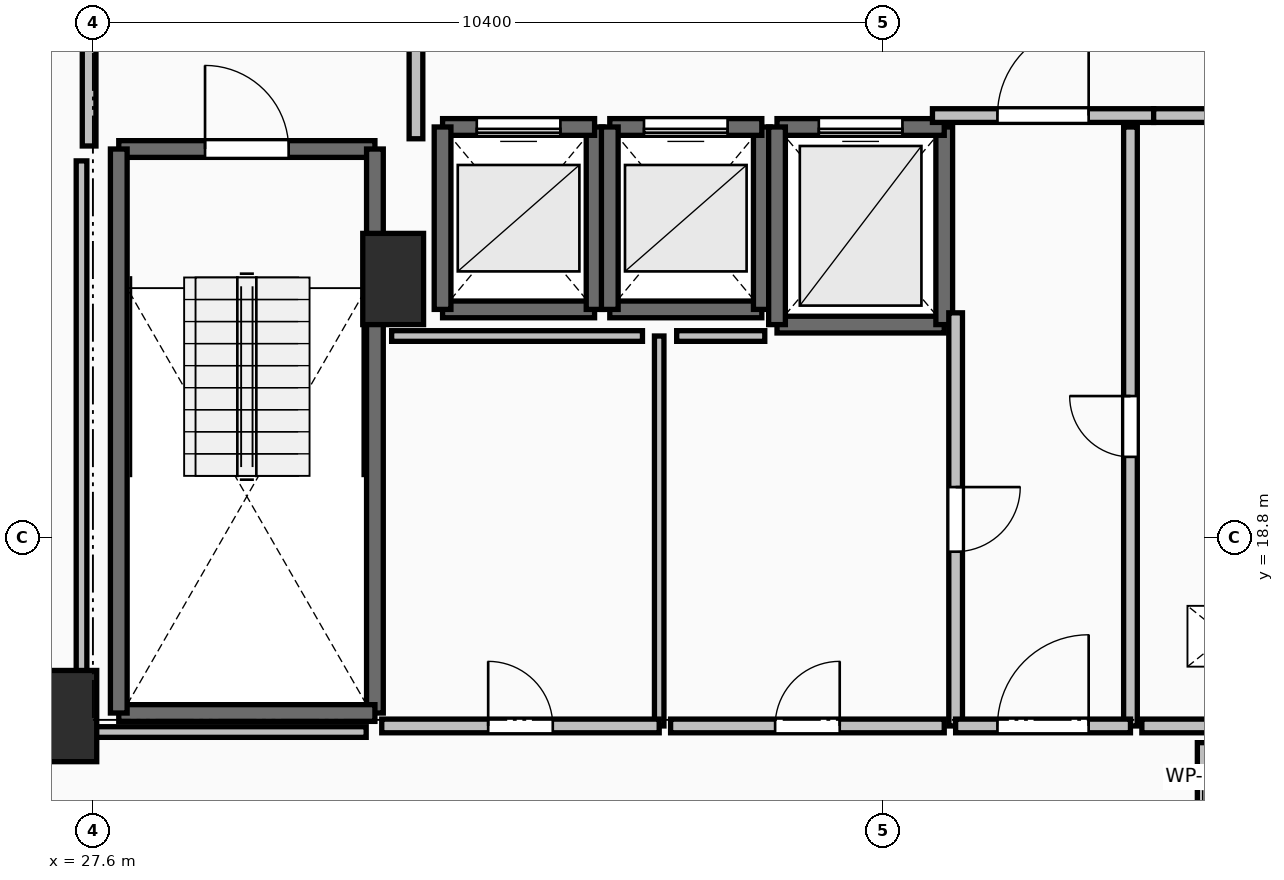
"""IFC4 building model, lengths in metres.
Left out: names, types, materials, properties, quantities, classifications, styles, units other than length and angle.
Written with IfcOpenShell. Run it as: python <this file> out.ifc"""

import sys

from ifc_helpers import new_model, si_unit, direction, frame, frame_2d, origin, origin_2d, place, context, subcontext, project, spatial, rectangle, extrude, element, fill, save


model = new_model("IFC4")
c1 = context("Model", 3, precision=1e-05, world=origin(), true_north=direction((0.0, 1.0)))
c2 = subcontext(c1, "Body", "Model", "MODEL_VIEW")
j1 = project(units=[si_unit("LENGTHUNIT", "METRE"), si_unit("PLANEANGLEUNIT", "RADIAN")], contexts=[c1])
p1 = place(None, origin())
s1 = spatial("IfcSite", under=j1, at=p1, CompositionType="ELEMENT")
p2 = place(p1, origin())
s2 = spatial("IfcBuilding", under=s1, at=p2, CompositionType="ELEMENT")
p3 = place(p2, frame((0.0, 0.0, 146.6)))
s3 = spatial("IfcBuildingStorey", under=s2, at=p3, CompositionType="ELEMENT", Elevation=146.6)
for number, where, z_axis, x_axis in (
    (1, (27.25, 16.45, 0.0), (0.0, 0.0, 1.0), (1.0, 0.0, 0.0)),
    (2, (31.55, 22.2, 0.0), (0.0, 0.0, 1.0), (1.0, 0.0, 0.0)),
):
    element("IfcColumn", number, at=place(p3, frame(where, z_axis=z_axis, x_axis=x_axis)), inside=s3, PredefinedType="PILASTER", context=c2, shape_type="SweptSolid", body=[
        extrude(rectangle(XDim=0.8, YDim=1.2, at=origin_2d()), origin(), (0.0, 0.0, 1.0), 3.5),
    ])
p4 = place(p3, frame((27.94, 23.91, 0.0), z_axis=(0.0, 0.0, 1.0), x_axis=(1.0, 0.0, 0.0)))
e3 = element("IfcWall", 3, at=p4, inside=s3, PredefinedType="SOLIDWALL", context=c2, shape_type="SweptSolid", body=[
    extrude(rectangle(XDim=3.37, YDim=0.22, at=frame_2d((1.685, 0.0))), origin(), (0.0, 0.0, 1.0), 3.24),
])
p5 = place(p4, frame((1.135, 0.0, 0.0)))
e4 = element("IfcOpeningElement", 4, at=p5, cuts=e3, PredefinedType="OPENING", context=c2, shape_type="SweptSolid", body=[
    extrude(rectangle(XDim=1.1, YDim=2.15, at=frame_2d((0.55, 1.075))), frame((0.0, 0.125, 0.0), z_axis=(0.0, -1.0, 0.0), x_axis=(1.0, 0.0, 0.0)), (0.0, 0.0, 1.0), 0.25),
])
p6 = place(p3, frame((31.31, 23.91, 0.0), z_axis=(0.0, 0.0, 1.0), x_axis=(0.0, -1.0, 0.0)))
e5 = element("IfcWall", 5, at=p6, inside=s3, PredefinedType="SOLIDWALL", context=c2, shape_type="SweptSolid", body=[
    extrude(rectangle(XDim=7.42, YDim=0.22, at=frame_2d((3.71, 0.0))), origin(), (0.0, 0.0, 1.0), 3.24),
])
p7 = place(p3, frame((31.31, 16.49, 0.0), z_axis=(0.0, 0.0, 1.0), x_axis=(-1.0, 0.0, 0.0)))
e6 = element("IfcWall", 6, at=p7, inside=s3, PredefinedType="SOLIDWALL", context=c2, shape_type="SweptSolid", body=[
    extrude(rectangle(XDim=3.37, YDim=0.22, at=frame_2d((1.685, 0.0))), origin(), (0.0, 0.0, 1.0), 3.24),
])
p8 = place(p3, frame((27.94, 16.49, 0.0), z_axis=(0.0, 0.0, 1.0), x_axis=(0.0, 1.0, 0.0)))
e7 = element("IfcWall", 7, at=p8, inside=s3, PredefinedType="SOLIDWALL", context=c2, shape_type="SweptSolid", body=[
    extrude(rectangle(XDim=7.42, YDim=0.22, at=frame_2d((3.71, 0.0))), origin(), (0.0, 0.0, 1.0), 3.24),
])
p9 = place(p3, frame((32.2, 21.8, 0.0), z_axis=(0.0, 0.0, 1.0), x_axis=(1.0, 0.0, 0.0)))
e8 = element("IfcWall", 8, at=p9, inside=s3, PredefinedType="SOLIDWALL", context=c2, shape_type="SweptSolid", body=[
    extrude(rectangle(XDim=2.0, YDim=0.22, at=frame_2d((1.0, 0.0))), origin(), (0.0, 0.0, 1.0), 3.24),
])
p10 = place(p3, frame((34.2, 21.8, 0.0), z_axis=(0.0, 0.0, 1.0), x_axis=(0.0, 1.0, 0.0)))
e9 = element("IfcWall", 9, at=p10, inside=s3, PredefinedType="SOLIDWALL", context=c2, shape_type="SweptSolid", body=[
    extrude(rectangle(XDim=2.4, YDim=0.22, at=frame_2d((1.2, 0.0))), origin(), (0.0, 0.0, 1.0), 3.24),
])
p11 = place(p3, frame((34.2, 24.2, 0.0), z_axis=(0.0, 0.0, 1.0), x_axis=(-1.0, 0.0, 0.0)))
e10 = element("IfcWall", 10, at=p11, inside=s3, PredefinedType="SOLIDWALL", context=c2, shape_type="SweptSolid", body=[
    extrude(rectangle(XDim=2.0, YDim=0.22, at=frame_2d((1.0, 0.0))), origin(), (0.0, 0.0, 1.0), 3.24),
])
p12 = place(p11, frame((0.45, 0.0, 0.0)))
e11 = element("IfcOpeningElement", 11, at=p12, cuts=e10, PredefinedType="OPENING", context=c2, shape_type="SweptSolid", body=[
    extrude(rectangle(XDim=1.1, YDim=2.2, at=frame_2d((0.55, 1.1))), frame((0.0, 0.125, 0.0), z_axis=(0.0, -1.0, 0.0), x_axis=(1.0, 0.0, 0.0)), (0.0, 0.0, 1.0), 0.25),
])
p13 = place(p3, frame((32.2, 24.2, 0.0), z_axis=(0.0, 0.0, 1.0), x_axis=(0.0, -1.0, 0.0)))
e12 = element("IfcWall", 12, at=p13, inside=s3, PredefinedType="SOLIDWALL", context=c2, shape_type="SweptSolid", body=[
    extrude(rectangle(XDim=2.4, YDim=0.22, at=frame_2d((1.2, 0.0))), origin(), (0.0, 0.0, 1.0), 3.24),
])
p14 = place(p3, frame((34.4, 21.8, 0.0), z_axis=(0.0, 0.0, 1.0), x_axis=(1.0, 0.0, 0.0)))
e13 = element("IfcWall", 13, at=p14, inside=s3, PredefinedType="SOLIDWALL", context=c2, shape_type="SweptSolid", body=[
    extrude(rectangle(XDim=2.0, YDim=0.22, at=frame_2d((1.0, 0.0))), origin(), (0.0, 0.0, 1.0), 3.24),
])
p15 = place(p3, frame((36.4, 21.8, 0.0), z_axis=(0.0, 0.0, 1.0), x_axis=(0.0, 1.0, 0.0)))
e14 = element("IfcWall", 14, at=p15, inside=s3, PredefinedType="SOLIDWALL", context=c2, shape_type="SweptSolid", body=[
    extrude(rectangle(XDim=2.4, YDim=0.22, at=frame_2d((1.2, 0.0))), origin(), (0.0, 0.0, 1.0), 3.24),
])
p16 = place(p3, frame((36.4, 24.2, 0.0), z_axis=(0.0, 0.0, 1.0), x_axis=(-1.0, 0.0, 0.0)))
e15 = element("IfcWall", 15, at=p16, inside=s3, PredefinedType="SOLIDWALL", context=c2, shape_type="SweptSolid", body=[
    extrude(rectangle(XDim=2.0, YDim=0.22, at=frame_2d((1.0, 0.0))), origin(), (0.0, 0.0, 1.0), 3.24),
])
p17 = place(p16, frame((0.45, 0.0, 0.0)))
e16 = element("IfcOpeningElement", 16, at=p17, cuts=e15, PredefinedType="OPENING", context=c2, shape_type="SweptSolid", body=[
    extrude(rectangle(XDim=1.1, YDim=2.2, at=frame_2d((0.55, 1.1))), frame((0.0, 0.125, 0.0), z_axis=(0.0, -1.0, 0.0), x_axis=(1.0, 0.0, 0.0)), (0.0, 0.0, 1.0), 0.25),
])
p18 = place(p3, frame((34.4, 24.2, 0.0), z_axis=(0.0, 0.0, 1.0), x_axis=(0.0, -1.0, 0.0)))
e17 = element("IfcWall", 17, at=p18, inside=s3, PredefinedType="SOLIDWALL", context=c2, shape_type="SweptSolid", body=[
    extrude(rectangle(XDim=2.4, YDim=0.22, at=frame_2d((1.2, 0.0))), origin(), (0.0, 0.0, 1.0), 3.24),
])
p19 = place(p3, frame((36.6, 21.6, 0.0), z_axis=(0.0, 0.0, 1.0), x_axis=(1.0, 0.0, 0.0)))
e18 = element("IfcWall", 18, at=p19, inside=s3, PredefinedType="SOLIDWALL", context=c2, shape_type="SweptSolid", body=[
    extrude(rectangle(XDim=2.2, YDim=0.22, at=frame_2d((1.1, 0.0))), origin(), (0.0, 0.0, 1.0), 3.24),
])
p20 = place(p3, frame((38.8, 21.6, 0.0), z_axis=(0.0, 0.0, 1.0), x_axis=(0.0, 1.0, 0.0)))
e19 = element("IfcWall", 19, at=p20, inside=s3, PredefinedType="SOLIDWALL", context=c2, shape_type="SweptSolid", body=[
    extrude(rectangle(XDim=2.6, YDim=0.22, at=frame_2d((1.3, 0.0))), origin(), (0.0, 0.0, 1.0), 3.24),
])
p21 = place(p3, frame((38.8, 24.2, 0.0), z_axis=(0.0, 0.0, 1.0), x_axis=(-1.0, 0.0, 0.0)))
e20 = element("IfcWall", 20, at=p21, inside=s3, PredefinedType="SOLIDWALL", context=c2, shape_type="SweptSolid", body=[
    extrude(rectangle(XDim=2.2, YDim=0.22, at=frame_2d((1.1, 0.0))), origin(), (0.0, 0.0, 1.0), 3.24),
])
p22 = place(p21, frame((0.55, 0.0, 0.0)))
e21 = element("IfcOpeningElement", 21, at=p22, cuts=e20, PredefinedType="OPENING", context=c2, shape_type="SweptSolid", body=[
    extrude(rectangle(XDim=1.1, YDim=2.2, at=frame_2d((0.55, 1.1))), frame((0.0, 0.125, 0.0), z_axis=(0.0, -1.0, 0.0), x_axis=(1.0, 0.0, 0.0)), (0.0, 0.0, 1.0), 0.25),
])
p23 = place(p3, frame((36.6, 24.2, 0.0), z_axis=(0.0, 0.0, 1.0), x_axis=(0.0, -1.0, 0.0)))
e22 = element("IfcWall", 22, at=p23, inside=s3, PredefinedType="SOLIDWALL", context=c2, shape_type="SweptSolid", body=[
    extrude(rectangle(XDim=2.6, YDim=0.22, at=frame_2d((1.3, 0.0))), origin(), (0.0, 0.0, 1.0), 3.24),
])
p24 = place(p3, frame((31.85, 24.045, 0.0), z_axis=(0.0, 0.0, 1.0), x_axis=(0.0, 1.0, 0.0)))
e23 = element("IfcWall", 23, at=p24, inside=s3, PredefinedType="PARTITIONING", context=c2, shape_type="SweptSolid", body=[
    extrude(rectangle(XDim=3.91, YDim=0.18, at=frame_2d((1.955, 0.0))), origin(), (0.0, 0.0, 1.0), 3.24),
])
p25 = place(p24, frame((1.355, 0.0, 0.0)))
e24 = element("IfcOpeningElement", 24, at=p25, cuts=e23, PredefinedType="OPENING", context=c2, shape_type="SweptSolid", body=[
    extrude(rectangle(XDim=1.2, YDim=2.15, at=frame_2d((0.6, 1.075))), frame((0.0, 0.105, 0.0), z_axis=(0.0, -1.0, 0.0), x_axis=(1.0, 0.0, 0.0)), (0.0, 0.0, 1.0), 0.21),
])
p26 = place(p3, frame((27.55, 28.0, 0.0), z_axis=(0.0, 0.0, 1.0), x_axis=(0.0, -1.0, 0.0)))
e25 = element("IfcWall", 25, at=p26, inside=s3, PredefinedType="PARTITIONING", context=c2, shape_type="SweptSolid", body=[
    extrude(rectangle(XDim=4.05, YDim=0.18, at=frame_2d((2.025, 0.0))), origin(), (0.0, 0.0, 1.0), 3.24),
])
p27 = place(p26, frame((1.425, 0.0, 0.0)))
e26 = element("IfcOpeningElement", 26, at=p27, cuts=e25, PredefinedType="OPENING", context=c2, shape_type="SweptSolid", body=[
    extrude(rectangle(XDim=1.2, YDim=2.15, at=frame_2d((0.6, 1.075))), frame((0.0, 0.105, 0.0), z_axis=(0.0, -1.0, 0.0), x_axis=(1.0, 0.0, 0.0)), (0.0, 0.0, 1.0), 0.21),
])
p28 = place(p3, frame((38.645, 24.35, 0.0), z_axis=(0.0, 0.0, 1.0), x_axis=(1.0, 0.0, 0.0)))
e27 = element("IfcWall", 27, at=p28, inside=s3, PredefinedType="PARTITIONING", context=c2, shape_type="SweptSolid", body=[
    extrude(rectangle(XDim=2.91, YDim=0.18, at=frame_2d((1.455, 0.0))), origin(), (0.0, 0.0, 1.0), 3.24),
])
p29 = place(p28, frame((0.855, 0.0, 0.0)))
e28 = element("IfcOpeningElement", 28, at=p29, cuts=e27, PredefinedType="OPENING", context=c2, shape_type="SweptSolid", body=[
    extrude(rectangle(XDim=1.2, YDim=2.15, at=frame_2d((0.6, 1.075))), frame((0.0, 0.105, 0.0), z_axis=(0.0, -1.0, 0.0), x_axis=(1.0, 0.0, 0.0)), (0.0, 0.0, 1.0), 0.21),
])
p30 = place(p3, frame((41.555, 24.35, 0.0), z_axis=(0.0, 0.0, 1.0), x_axis=(1.0, 0.0, 0.0)))
e29 = element("IfcWall", 29, at=p30, inside=s3, PredefinedType="PARTITIONING", context=c2, shape_type="SweptSolid", body=[
    extrude(rectangle(XDim=2.445, YDim=0.18, at=frame_2d((1.223, 0.0))), origin(), (0.0, 0.0, 1.0), 3.24),
])
p31 = place(p30, frame((0.823, 0.0, 0.0)))
e30 = element("IfcOpeningElement", 30, at=p31, cuts=e29, PredefinedType="OPENING", context=c2, shape_type="SweptSolid", body=[
    extrude(rectangle(XDim=0.8, YDim=2.05, at=frame_2d((0.4, 1.025))), frame((0.0, 0.105, 0.0), z_axis=(0.0, -1.0, 0.0), x_axis=(1.0, 0.0, 0.0)), (0.0, 0.0, 1.0), 0.21),
])
p32 = place(p3, frame((41.25, 16.32, 0.0), z_axis=(0.0, 0.0, 1.0), x_axis=(0.0, 1.0, 0.0)))
e31 = element("IfcWall", 31, at=p32, inside=s3, PredefinedType="PARTITIONING", context=c2, shape_type="SweptSolid", body=[
    extrude(rectangle(XDim=7.88, YDim=0.18, at=frame_2d((3.94, 0.0))), origin(), (0.0, 0.0, 1.0), 3.24),
])
p33 = place(p32, frame((3.54, 0.0, 0.0)))
e32 = element("IfcOpeningElement", 32, at=p33, cuts=e31, PredefinedType="OPENING", context=c2, shape_type="SweptSolid", body=[
    extrude(rectangle(XDim=0.8, YDim=2.05, at=frame_2d((0.4, 1.025))), frame((0.0, 0.105, 0.0), z_axis=(0.0, -1.0, 0.0), x_axis=(1.0, 0.0, 0.0)), (0.0, 0.0, 1.0), 0.21),
])
p34 = place(p3, frame((38.95, 21.755, 0.0), z_axis=(0.0, 0.0, 1.0), x_axis=(0.0, -1.0, 0.0)))
e33 = element("IfcWall", 33, at=p34, inside=s3, PredefinedType="PARTITIONING", context=c2, shape_type="SweptSolid", body=[
    extrude(rectangle(XDim=5.435, YDim=0.18, at=frame_2d((2.717, 0.0))), origin(), (0.0, 0.0, 1.0), 3.24),
])
p35 = place(p34, frame((2.292, 0.0, 0.0)))
e34 = element("IfcOpeningElement", 34, at=p35, cuts=e33, PredefinedType="OPENING", context=c2, shape_type="SweptSolid", body=[
    extrude(rectangle(XDim=0.85, YDim=2.1, at=frame_2d((0.425, 1.05))), frame((0.0, 0.105, 0.0), z_axis=(0.0, -1.0, 0.0), x_axis=(1.0, 0.0, 0.0)), (0.0, 0.0, 1.0), 0.21),
])
p36 = place(p3, frame((38.95, 16.32, 0.0), z_axis=(0.0, 0.0, 1.0), x_axis=(1.0, 0.0, 0.0)))
e35 = element("IfcWall", 35, at=p36, inside=s3, PredefinedType="PARTITIONING", context=c2, shape_type="SweptSolid", body=[
    extrude(rectangle(XDim=2.3, YDim=0.18, at=frame_2d((1.15, 0.0))), origin(), (0.0, 0.0, 1.0), 3.24),
])
p37 = place(p36, frame((0.55, 0.0, 0.0)))
e36 = element("IfcOpeningElement", 36, at=p37, cuts=e35, PredefinedType="OPENING", context=c2, shape_type="SweptSolid", body=[
    extrude(rectangle(XDim=1.2, YDim=2.15, at=frame_2d((0.6, 1.075))), frame((0.0, 0.105, 0.0), z_axis=(0.0, -1.0, 0.0), x_axis=(1.0, 0.0, 0.0)), (0.0, 0.0, 1.0), 0.21),
])
p38 = place(p3, frame((41.4, 16.32, 0.0), z_axis=(0.0, 0.0, 1.0), x_axis=(1.0, 0.0, 0.0)))
e37 = element("IfcWall", 37, at=p38, inside=s3, PredefinedType="PARTITIONING", context=c2, shape_type="SweptSolid", body=[
    extrude(rectangle(XDim=3.2, YDim=0.18, at=frame_2d((1.6, 0.0))), origin(), (0.0, 0.0, 1.0), 3.24),
])
p39 = place(p38, frame((1.2, 0.0, 0.0)))
e38 = element("IfcOpeningElement", 38, at=p39, cuts=e37, PredefinedType="OPENING", context=c2, shape_type="SweptSolid", body=[
    extrude(rectangle(XDim=0.8, YDim=2.05, at=frame_2d((0.4, 1.025))), frame((0.0, 0.105, 0.0), z_axis=(0.0, -1.0, 0.0), x_axis=(1.0, 0.0, 0.0)), (0.0, 0.0, 1.0), 0.21),
])
p40 = place(p3, frame((35.05, 16.32, 0.0), z_axis=(0.0, 0.0, 1.0), x_axis=(0.0, 1.0, 0.0)))
e39 = element("IfcWall", 39, at=p40, inside=s3, PredefinedType="PARTITIONING", context=c2, shape_type="SweptSolid", body=[
    extrude(rectangle(XDim=5.13, YDim=0.125, at=frame_2d((2.565, 0.0))), origin(), (0.0, 0.0, 1.0), 3.24),
])
p41 = place(p3, frame((31.4, 16.32, 0.0), z_axis=(0.0, 0.0, 1.0), x_axis=(1.0, 0.0, 0.0)))
e40 = element("IfcWall", 40, at=p41, inside=s3, PredefinedType="PARTITIONING", context=c2, shape_type="SweptSolid", body=[
    extrude(rectangle(XDim=3.65, YDim=0.18, at=frame_2d((1.825, 0.0))), origin(), (0.0, 0.0, 1.0), 3.24),
])
p42 = place(p41, frame((1.4, 0.0, 0.0)))
e41 = element("IfcOpeningElement", 41, at=p42, cuts=e40, PredefinedType="OPENING", context=c2, shape_type="SweptSolid", body=[
    extrude(rectangle(XDim=0.85, YDim=2.1, at=frame_2d((0.425, 1.05))), frame((0.0, 0.105, 0.0), z_axis=(0.0, -1.0, 0.0), x_axis=(1.0, 0.0, 0.0)), (0.0, 0.0, 1.0), 0.21),
])
p43 = place(p3, frame((35.2, 16.32, 0.0), z_axis=(0.0, 0.0, 1.0), x_axis=(1.0, 0.0, 0.0)))
e42 = element("IfcWall", 42, at=p43, inside=s3, PredefinedType="PARTITIONING", context=c2, shape_type="SweptSolid", body=[
    extrude(rectangle(XDim=3.6, YDim=0.18, at=frame_2d((1.8, 0.0))), origin(), (0.0, 0.0, 1.0), 3.24),
])
p44 = place(p43, frame((1.375, 0.0, 0.0)))
e43 = element("IfcOpeningElement", 43, at=p44, cuts=e42, PredefinedType="OPENING", context=c2, shape_type="SweptSolid", body=[
    extrude(rectangle(XDim=0.85, YDim=2.1, at=frame_2d((0.425, 1.05))), frame((0.0, 0.105, 0.0), z_axis=(0.0, -1.0, 0.0), x_axis=(1.0, 0.0, 0.0)), (0.0, 0.0, 1.0), 0.21),
])
p45 = place(p3, frame((34.83, 21.45, 0.0), z_axis=(0.0, 0.0, 1.0), x_axis=(-1.0, 0.0, 0.0)))
e44 = element("IfcWall", 44, at=p45, inside=s3, PredefinedType="PARTITIONING", context=c2, shape_type="SweptSolid", body=[
    extrude(rectangle(XDim=3.3, YDim=0.14, at=frame_2d((1.65, 0.0))), origin(), (0.0, 0.0, 1.0), 3.24),
])
p46 = place(p3, frame((36.439, 21.45, 0.0), z_axis=(0.0, 0.0, 1.0), x_axis=(-1.0, 0.0, 0.0)))
e45 = element("IfcWall", 45, at=p46, inside=s3, PredefinedType="PARTITIONING", context=c2, shape_type="SweptSolid", body=[
    extrude(rectangle(XDim=1.159, YDim=0.14, at=frame_2d((0.58, 0.0))), origin(), (0.0, 0.0, 1.0), 3.24),
])
p47 = place(p3, frame((27.45, 23.754, 0.0), z_axis=(0.0, 0.0, 1.0), x_axis=(0.0, -1.0, 0.0)))
e46 = element("IfcWall", 46, at=p47, inside=s3, PredefinedType="PARTITIONING", context=c2, shape_type="SweptSolid", body=[
    extrude(rectangle(XDim=7.514, YDim=0.14, at=frame_2d((3.757, 0.0))), origin(), (0.0, 0.0, 1.0), 2.432),
])
p48 = place(p3, frame((27.45, 16.24, 0.0), z_axis=(0.0, 0.0, 1.0), x_axis=(1.0, 0.0, 0.0)))
e47 = element("IfcWall", 47, at=p48, inside=s3, PredefinedType="PARTITIONING", context=c2, shape_type="SweptSolid", body=[
    extrude(rectangle(XDim=3.745, YDim=0.14, at=frame_2d((1.873, 0.0))), origin(), (0.0, 0.0, 1.0), 2.432),
])
p49 = place(p3, frame((42.2, 16.1, 0.0), z_axis=(0.0, 0.0, 1.0), x_axis=(0.0, -1.0, 0.0)))
e48 = element("IfcWall", 48, at=p49, inside=s3, PredefinedType="PARTITIONING", context=c2, shape_type="SweptSolid", body=[
    extrude(rectangle(XDim=1.83, YDim=0.14, at=frame_2d((0.915, 0.0))), origin(), (0.0, 0.0, 1.0), 3.24),
])
p50 = place(p5, origin())
e49 = element("IfcDoor", 49, at=p50, inside=s3, OperationType="SINGLE_SWING_LEFT", PredefinedType="DOOR", context=c2, shape_type="SweptSolid", body=[
    extrude(rectangle(XDim=1.1, YDim=2.15, at=frame_2d((0.55, 1.075))), frame((0.0, 0.025, 0.0), z_axis=(0.0, -1.0, 0.0), x_axis=(1.0, 0.0, 0.0)), (0.0, 0.0, 1.0), 0.05),
])
fill(e4, e49)
p51 = place(p12, origin())
e50 = element("IfcDoor", 50, at=p51, inside=s3, OperationType="SLIDING_TO_LEFT", PredefinedType="DOOR", context=c2, shape_type="SweptSolid", body=[
    extrude(rectangle(XDim=1.1, YDim=2.2, at=frame_2d((0.55, 1.1))), frame((0.0, 0.025, 0.0), z_axis=(0.0, -1.0, 0.0), x_axis=(1.0, 0.0, 0.0)), (0.0, 0.0, 1.0), 0.05),
])
fill(e11, e50)
p52 = place(p17, origin())
e51 = element("IfcDoor", 51, at=p52, inside=s3, OperationType="SLIDING_TO_LEFT", PredefinedType="DOOR", context=c2, shape_type="SweptSolid", body=[
    extrude(rectangle(XDim=1.1, YDim=2.2, at=frame_2d((0.55, 1.1))), frame((0.0, 0.025, 0.0), z_axis=(0.0, -1.0, 0.0), x_axis=(1.0, 0.0, 0.0)), (0.0, 0.0, 1.0), 0.05),
])
fill(e16, e51)
p53 = place(p22, origin())
e52 = element("IfcDoor", 52, at=p53, inside=s3, OperationType="SLIDING_TO_LEFT", PredefinedType="DOOR", context=c2, shape_type="SweptSolid", body=[
    extrude(rectangle(XDim=1.1, YDim=2.2, at=frame_2d((0.55, 1.1))), frame((0.0, 0.025, 0.0), z_axis=(0.0, -1.0, 0.0), x_axis=(1.0, 0.0, 0.0)), (0.0, 0.0, 1.0), 0.05),
])
fill(e21, e52)
p54 = place(p29, origin())
e53 = element("IfcDoor", 53, at=p54, inside=s3, OperationType="SINGLE_SWING_RIGHT", PredefinedType="DOOR", context=c2, shape_type="SweptSolid", body=[
    extrude(rectangle(XDim=1.2, YDim=2.15, at=frame_2d((0.6, 1.075))), frame((0.0, 0.025, 0.0), z_axis=(0.0, -1.0, 0.0), x_axis=(1.0, 0.0, 0.0)), (0.0, 0.0, 1.0), 0.05),
])
fill(e28, e53)
p55 = place(p33, origin())
e54 = element("IfcDoor", 54, at=p55, inside=s3, OperationType="SINGLE_SWING_RIGHT", PredefinedType="DOOR", context=c2, shape_type="SweptSolid", body=[
    extrude(rectangle(XDim=0.8, YDim=2.05, at=frame_2d((0.4, 1.025))), frame((0.0, 0.025, 0.0), z_axis=(0.0, -1.0, 0.0), x_axis=(1.0, 0.0, 0.0)), (0.0, 0.0, 1.0), 0.05),
])
fill(e32, e54)
p56 = place(p35, origin())
e55 = element("IfcDoor", 55, at=p56, inside=s3, OperationType="SINGLE_SWING_LEFT", PredefinedType="DOOR", context=c2, shape_type="SweptSolid", body=[
    extrude(rectangle(XDim=0.85, YDim=2.1, at=frame_2d((0.425, 1.05))), frame((0.0, 0.025, 0.0), z_axis=(0.0, -1.0, 0.0), x_axis=(1.0, 0.0, 0.0)), (0.0, 0.0, 1.0), 0.05),
])
fill(e34, e55)
p57 = place(p37, origin())
e56 = element("IfcDoor", 56, at=p57, inside=s3, OperationType="SINGLE_SWING_RIGHT", PredefinedType="DOOR", context=c2, shape_type="SweptSolid", body=[
    extrude(rectangle(XDim=1.2, YDim=2.15, at=frame_2d((0.6, 1.075))), frame((0.0, 0.025, 0.0), z_axis=(0.0, -1.0, 0.0), x_axis=(1.0, 0.0, 0.0)), (0.0, 0.0, 1.0), 0.05),
])
fill(e36, e56)
p58 = place(p42, origin())
e57 = element("IfcDoor", 57, at=p58, inside=s3, OperationType="SINGLE_SWING_LEFT", PredefinedType="DOOR", context=c2, shape_type="SweptSolid", body=[
    extrude(rectangle(XDim=0.85, YDim=2.1, at=frame_2d((0.425, 1.05))), frame((0.0, 0.025, 0.0), z_axis=(0.0, -1.0, 0.0), x_axis=(1.0, 0.0, 0.0)), (0.0, 0.0, 1.0), 0.05),
])
fill(e41, e57)
p59 = place(p44, origin())
e58 = element("IfcDoor", 58, at=p59, inside=s3, OperationType="SINGLE_SWING_RIGHT", PredefinedType="DOOR", context=c2, shape_type="SweptSolid", body=[
    extrude(rectangle(XDim=0.85, YDim=2.1, at=frame_2d((0.425, 1.05))), frame((0.0, 0.025, 0.0), z_axis=(0.0, -1.0, 0.0), x_axis=(1.0, 0.0, 0.0)), (0.0, 0.0, 1.0), 0.05),
])
fill(e43, e58)
save(model, sys.argv[1])
